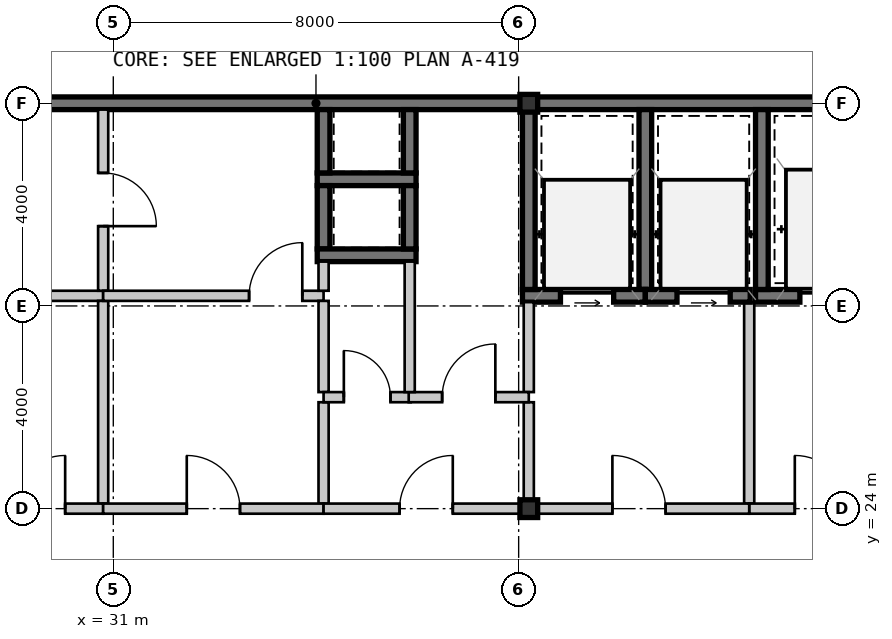
"""IFC4 building model, lengths in metres.
Left out: names, types, materials, properties, quantities, classifications, styles, units other than length and angle.
Written with IfcOpenShell. Run it as: python <this file> out.ifc"""

import sys

from ifc_helpers import new_model, si_unit, direction, frame, frame_2d, origin, origin_2d, place, context, subcontext, project, spatial, rectangle, hollow_rectangle, extrude, source, transform, mapped, element, fill, save


model = new_model("IFC4")
c1 = context("Model", 3, precision=1e-05, world=origin(), true_north=direction((0.0, 1.0)))
c2 = subcontext(c1, "Body", "Model", "MODEL_VIEW")
j1 = project(units=[si_unit("LENGTHUNIT", "METRE"), si_unit("PLANEANGLEUNIT", "RADIAN")], contexts=[c1])
p1 = place(None, origin())
s1 = spatial("IfcSite", under=j1, at=p1, CompositionType="ELEMENT")
p2 = place(p1, origin())
s2 = spatial("IfcBuilding", under=s1, at=p2, CompositionType="ELEMENT")
p3 = place(p2, frame((0.0, 0.0, 178.85)))
s3 = spatial("IfcBuildingStorey", under=s2, at=p3, CompositionType="ELEMENT", Elevation=178.85)
m1 = source(origin(), c2, "Body", "SweptSolid", [
    extrude(hollow_rectangle(XDim=0.35, YDim=0.35, WallThickness=0.016, at=origin_2d()), origin(), (0.0, 0.0, 1.0), 3.15),
])
for number, where, z_axis, x_axis in (
    (1, (39.2, 24.0, 0.0), (0.0, 0.0, 1.0), (1.0, 0.0, 0.0)),
    (2, (39.2, 32.0, 0.0), (0.0, 0.0, 1.0), (1.0, 0.0, 0.0)),
):
    element("IfcColumn", number, at=place(p3, frame(where, z_axis=z_axis, x_axis=x_axis)), inside=s3, PredefinedType="COLUMN", context=c2, shape_type="MappedRepresentation", body=[
        mapped(m1, transform((0.0, 0.0, 0.0), scale=1.0)),
    ])
m2 = source(origin(), c2, "Body", "SweptSolid", [
    extrude(rectangle(XDim=11.2, YDim=0.25, at=frame_2d((5.6, 0.0))), origin(), (0.0, 0.0, 1.0), 2.93),
])
p4 = place(p3, frame((28.0, 32.0, 0.0), z_axis=(0.0, 0.0, 1.0), x_axis=(1.0, 0.0, 0.0)))
e3 = element("IfcWall", 3, at=p4, inside=s3, PredefinedType="SHEAR", context=c2, shape_type="MappedRepresentation", body=[
    mapped(m2, transform((0.0, 0.0, 0.0), scale=1.0)),
])
m3 = source(origin(), c2, "Body", "SweptSolid", [
    extrude(rectangle(XDim=11.925, YDim=0.25, at=frame_2d((5.962, 0.0))), origin(), (0.0, 0.0, 1.0), 2.93),
])
p5 = place(p3, frame((39.2, 32.0, 0.0), z_axis=(0.0, 0.0, 1.0), x_axis=(1.0, 0.0, 0.0)))
e4 = element("IfcWall", 4, at=p5, inside=s3, PredefinedType="SHEAR", context=c2, shape_type="MappedRepresentation", body=[
    mapped(m3, transform((0.0, 0.0, 0.0), scale=1.0)),
])
m4 = source(origin(), c2, "Body", "SweptSolid", [
    extrude(rectangle(XDim=2.85, YDim=0.25, at=frame_2d((1.425, 0.0))), origin(), (0.0, 0.0, 1.0), 2.93),
])
p6 = place(p3, frame((43.675, 28.2, 0.0), z_axis=(0.0, 0.0, 1.0), x_axis=(1.0, 0.0, 0.0)))
e5 = element("IfcWall", 5, at=p6, inside=s3, PredefinedType="SHEAR", context=c2, shape_type="MappedRepresentation", body=[
    mapped(m4, transform((0.0, 0.0, 0.0), scale=1.0)),
])
m5 = source(origin(), c2, "Body", "SweptSolid", [
    extrude(rectangle(XDim=1.1, YDim=2.15, at=frame_2d((0.55, 1.075))), frame((0.0, 0.135, 0.0), z_axis=(0.0, -1.0, 0.0), x_axis=(1.0, 0.0, 0.0)), (0.0, 0.0, 1.0), 0.27),
])
p7 = place(p6, frame((0.875, 0.0, 0.0)))
e6 = element("IfcOpeningElement", 6, at=p7, cuts=e5, PredefinedType="OPENING", context=c2, shape_type="MappedRepresentation", body=[
    mapped(m5, transform((0.0, 0.0, 0.0), scale=1.0)),
])
m6 = source(origin(), c2, "Body", "SweptSolid", [
    extrude(rectangle(XDim=3.55, YDim=0.25, at=frame_2d((1.775, 0.0))), origin(), (0.0, 0.0, 1.0), 2.93),
])
p8 = place(p3, frame((43.8, 31.875, 0.0), z_axis=(0.0, 0.0, 1.0), x_axis=(0.0, -1.0, 0.0)))
e7 = element("IfcWall", 7, at=p8, inside=s3, PredefinedType="SHEAR", context=c2, shape_type="MappedRepresentation", body=[
    mapped(m6, transform((0.0, 0.0, 0.0), scale=1.0)),
])
m7 = source(origin(), c2, "Body", "SweptSolid", [
    extrude(rectangle(XDim=3.975, YDim=0.2, at=frame_2d((1.987, 0.0))), origin(), (0.0, 0.0, 1.0), 2.93),
])
p9 = place(p3, frame((43.55, 28.075, 0.0), z_axis=(0.0, 0.0, 1.0), x_axis=(0.0, -1.0, 0.0)))
e8 = element("IfcWall", 8, at=p9, inside=s3, PredefinedType="SOLIDWALL", context=c2, shape_type="MappedRepresentation", body=[
    mapped(m7, transform((0.0, 0.0, 0.0), scale=1.0)),
])
m8 = source(origin(), c2, "Body", "SweptSolid", [
    extrude(rectangle(XDim=2.725, YDim=0.2, at=frame_2d((1.362, 0.0))), origin(), (0.0, 0.0, 1.0), 2.397),
])
p10 = place(p3, frame((43.55, 24.0, 0.0), z_axis=(0.0, 0.0, 1.0), x_axis=(1.0, 0.0, 0.0)))
e9 = element("IfcWall", 9, at=p10, inside=s3, PredefinedType="SOLIDWALL", context=c2, shape_type="MappedRepresentation", body=[
    mapped(m8, transform((0.0, 0.0, 0.0), scale=1.0)),
])
m9 = source(origin(), c2, "Body", "SweptSolid", [
    extrude(rectangle(XDim=1.05, YDim=2.1, at=frame_2d((0.525, 1.05))), frame((0.0, 0.11, 0.0), z_axis=(0.0, -1.0, 0.0), x_axis=(1.0, 0.0, 0.0)), (0.0, 0.0, 1.0), 0.22),
])
p11 = place(p10, frame((0.9, 0.0, 0.0)))
e10 = element("IfcOpeningElement", 10, at=p11, cuts=e9, PredefinedType="OPENING", context=c2, shape_type="MappedRepresentation", body=[
    mapped(m9, transform((0.0, 0.0, 0.0), scale=1.0)),
])
m10 = source(origin(), c2, "Body", "SweptSolid", [
    extrude(rectangle(XDim=1.95, YDim=0.25, at=frame_2d((0.975, 0.0))), origin(), (0.0, 0.0, 1.0), 2.93),
])
p12 = place(p3, frame((35.025, 30.5, 0.0), z_axis=(0.0, 0.0, 1.0), x_axis=(1.0, 0.0, 0.0)))
e11 = element("IfcWall", 11, at=p12, inside=s3, PredefinedType="SHEAR", context=c2, shape_type="MappedRepresentation", body=[
    mapped(m10, transform((0.0, 0.0, 0.0), scale=1.0)),
])
m11 = source(origin(), c2, "Body", "SweptSolid", [
    extrude(rectangle(XDim=1.25, YDim=0.25, at=frame_2d((0.625, 0.0))), origin(), (0.0, 0.0, 1.0), 2.93),
])
for number, where, z_axis, x_axis in (
    (12, (35.15, 31.875, 0.0), (0.0, 0.0, 1.0), (0.0, -1.0, 0.0)),
    (13, (36.85, 30.625, 0.0), (0.0, 0.0, 1.0), (0.0, 1.0, 0.0)),
    (14, (35.15, 30.375, 0.0), (0.0, 0.0, 1.0), (0.0, -1.0, 0.0)),
):
    element("IfcWall", number, at=place(p3, frame(where, z_axis=z_axis, x_axis=x_axis)), inside=s3, PredefinedType="SHEAR", context=c2, shape_type="MappedRepresentation", body=[
        mapped(m11, transform((0.0, 0.0, 0.0), scale=1.0)),
    ])
p13 = place(p3, frame((35.025, 29.0, 0.0), z_axis=(0.0, 0.0, 1.0), x_axis=(1.0, 0.0, 0.0)))
e15 = element("IfcWall", 15, at=p13, inside=s3, PredefinedType="SHEAR", context=c2, shape_type="MappedRepresentation", body=[
    mapped(m10, transform((0.0, 0.0, 0.0), scale=1.0)),
])
p14 = place(p3, frame((36.85, 29.125, 0.0), z_axis=(0.0, 0.0, 1.0), x_axis=(0.0, 1.0, 0.0)))
e16 = element("IfcWall", 16, at=p14, inside=s3, PredefinedType="SHEAR", context=c2, shape_type="MappedRepresentation", body=[
    mapped(m11, transform((0.0, 0.0, 0.0), scale=1.0)),
])
p15 = place(p3, frame((41.5, 28.325, 0.0), z_axis=(0.0, 0.0, 1.0), x_axis=(0.0, 1.0, 0.0)))
e17 = element("IfcWall", 17, at=p15, inside=s3, PredefinedType="SHEAR", context=c2, shape_type="MappedRepresentation", body=[
    mapped(m6, transform((0.0, 0.0, 0.0), scale=1.0)),
])
m12 = source(origin(), c2, "Body", "SweptSolid", [
    extrude(rectangle(XDim=2.425, YDim=0.25, at=frame_2d((1.212, 0.0))), origin(), (0.0, 0.0, 1.0), 2.93),
])
p16 = place(p3, frame((39.075, 28.2, 0.0), z_axis=(0.0, 0.0, 1.0), x_axis=(1.0, 0.0, 0.0)))
e18 = element("IfcWall", 18, at=p16, inside=s3, PredefinedType="SHEAR", context=c2, shape_type="MappedRepresentation", body=[
    mapped(m12, transform((0.0, 0.0, 0.0), scale=1.0)),
])
m13 = source(origin(), c2, "Body", "SweptSolid", [
    extrude(rectangle(XDim=1.05, YDim=2.15, at=frame_2d((0.525, 1.075))), frame((0.0, 0.135, 0.0), z_axis=(0.0, -1.0, 0.0), x_axis=(1.0, 0.0, 0.0)), (0.0, 0.0, 1.0), 0.27),
])
p17 = place(p16, frame((0.75, 0.0, 0.0)))
e19 = element("IfcOpeningElement", 19, at=p17, cuts=e18, PredefinedType="OPENING", context=c2, shape_type="MappedRepresentation", body=[
    mapped(m13, transform((0.0, 0.0, 0.0), scale=1.0)),
])
p18 = place(p3, frame((39.2, 31.875, 0.0), z_axis=(0.0, 0.0, 1.0), x_axis=(0.0, -1.0, 0.0)))
e20 = element("IfcWall", 20, at=p18, inside=s3, PredefinedType="SHEAR", context=c2, shape_type="MappedRepresentation", body=[
    mapped(m6, transform((0.0, 0.0, 0.0), scale=1.0)),
])
m14 = source(origin(), c2, "Body", "SweptSolid", [
    extrude(rectangle(XDim=2.07, YDim=0.25, at=frame_2d((1.035, 0.0))), origin(), (0.0, 0.0, 1.0), 2.93),
])
p19 = place(p3, frame((41.5, 28.2, 0.0), z_axis=(0.0, 0.0, 1.0), x_axis=(1.0, 0.0, 0.0)))
e21 = element("IfcWall", 21, at=p19, inside=s3, PredefinedType="SHEAR", context=c2, shape_type="MappedRepresentation", body=[
    mapped(m14, transform((0.0, 0.0, 0.0), scale=1.0)),
])
p20 = place(p19, frame((0.625, 0.0, 0.0)))
e22 = element("IfcOpeningElement", 22, at=p20, cuts=e21, PredefinedType="OPENING", context=c2, shape_type="MappedRepresentation", body=[
    mapped(m13, transform((0.0, 0.0, 0.0), scale=1.0)),
])
m15 = source(origin(), c2, "Body", "SweptSolid", [
    extrude(rectangle(XDim=2.0, YDim=0.2, at=frame_2d((1.0, 0.0))), origin(), (0.0, 0.0, 1.0), 2.47),
])
p21 = place(p3, frame((39.2, 24.1, 0.0), z_axis=(0.0, 0.0, 1.0), x_axis=(0.0, 1.0, 0.0)))
e23 = element("IfcWall", 23, at=p21, inside=s3, PredefinedType="SOLIDWALL", context=c2, shape_type="MappedRepresentation", body=[
    mapped(m15, transform((0.0, 0.0, 0.0), scale=1.0)),
])
m16 = source(origin(), c2, "Body", "SweptSolid", [
    extrude(rectangle(XDim=1.775, YDim=0.2, at=frame_2d((0.887, 0.0))), origin(), (0.0, 0.0, 1.0), 2.47),
])
p22 = place(p3, frame((39.2, 26.3, 0.0), z_axis=(0.0, 0.0, 1.0), x_axis=(0.0, 1.0, 0.0)))
e24 = element("IfcWall", 24, at=p22, inside=s3, PredefinedType="SOLIDWALL", context=c2, shape_type="MappedRepresentation", body=[
    mapped(m16, transform((0.0, 0.0, 0.0), scale=1.0)),
])
m17 = source(origin(), c2, "Body", "SweptSolid", [
    extrude(rectangle(XDim=4.35, YDim=0.2, at=frame_2d((2.175, 0.0))), origin(), (0.0, 0.0, 1.0), 2.397),
])
p23 = place(p3, frame((43.55, 24.0, 0.0), z_axis=(0.0, 0.0, 1.0), x_axis=(-1.0, 0.0, 0.0)))
e25 = element("IfcWall", 25, at=p23, inside=s3, PredefinedType="SOLIDWALL", context=c2, shape_type="MappedRepresentation", body=[
    mapped(m17, transform((0.0, 0.0, 0.0), scale=1.0)),
])
p24 = place(p23, frame((1.65, 0.0, 0.0)))
e26 = element("IfcOpeningElement", 26, at=p24, cuts=e25, PredefinedType="OPENING", context=c2, shape_type="MappedRepresentation", body=[
    mapped(m9, transform((0.0, 0.0, 0.0), scale=1.0)),
])
m18 = source(origin(), c2, "Body", "SweptSolid", [
    extrude(rectangle(XDim=4.35, YDim=0.2, at=frame_2d((2.175, 0.0))), origin(), (0.0, 0.0, 1.0), 2.93),
])
p25 = place(p3, frame((26.45, 28.2, 0.0), z_axis=(0.0, 0.0, 1.0), x_axis=(1.0, 0.0, 0.0)))
e27 = element("IfcWall", 27, at=p25, inside=s3, PredefinedType="SOLIDWALL", context=c2, shape_type="MappedRepresentation", body=[
    mapped(m18, transform((0.0, 0.0, 0.0), scale=1.0)),
])
m19 = source(origin(), c2, "Body", "SweptSolid", [
    extrude(rectangle(XDim=4.0, YDim=0.2, at=frame_2d((2.0, 0.0))), origin(), (0.0, 0.0, 1.0), 2.93),
])
p26 = place(p3, frame((30.8, 28.1, 0.0), z_axis=(0.0, 0.0, 1.0), x_axis=(0.0, -1.0, 0.0)))
e28 = element("IfcWall", 28, at=p26, inside=s3, PredefinedType="SOLIDWALL", context=c2, shape_type="MappedRepresentation", body=[
    mapped(m19, transform((0.0, 0.0, 0.0), scale=1.0)),
])
m20 = source(origin(), c2, "Body", "SweptSolid", [
    extrude(rectangle(XDim=4.35, YDim=0.2, at=frame_2d((2.175, 0.0))), origin(), (0.0, 0.0, 1.0), 2.47),
])
p27 = place(p3, frame((30.8, 24.0, 0.0), z_axis=(0.0, 0.0, 1.0), x_axis=(-1.0, 0.0, 0.0)))
e29 = element("IfcWall", 29, at=p27, inside=s3, PredefinedType="SOLIDWALL", context=c2, shape_type="MappedRepresentation", body=[
    mapped(m20, transform((0.0, 0.0, 0.0), scale=1.0)),
])
p28 = place(p27, frame((0.75, 0.0, 0.0)))
e30 = element("IfcOpeningElement", 30, at=p28, cuts=e29, PredefinedType="OPENING", context=c2, shape_type="MappedRepresentation", body=[
    mapped(m9, transform((0.0, 0.0, 0.0), scale=1.0)),
])
m21 = source(origin(), c2, "Body", "SweptSolid", [
    extrude(rectangle(XDim=3.575, YDim=0.2, at=frame_2d((1.788, 0.0))), origin(), (0.0, 0.0, 1.0), 2.93),
])
p29 = place(p3, frame((30.8, 31.875, 0.0), z_axis=(0.0, 0.0, 1.0), x_axis=(0.0, -1.0, 0.0)))
e31 = element("IfcWall", 31, at=p29, inside=s3, PredefinedType="SOLIDWALL", context=c2, shape_type="MappedRepresentation", body=[
    mapped(m21, transform((0.0, 0.0, 0.0), scale=1.0)),
])
p30 = place(p29, frame((1.25, 0.0, 0.0)))
e32 = element("IfcOpeningElement", 32, at=p30, cuts=e31, PredefinedType="OPENING", context=c2, shape_type="MappedRepresentation", body=[
    mapped(m9, transform((0.0, 0.0, 0.0), scale=1.0)),
])
m22 = source(origin(), c2, "Body", "SweptSolid", [
    extrude(rectangle(XDim=4.35, YDim=0.2, at=frame_2d((2.175, 0.0))), origin(), (0.0, 0.0, 1.0), 2.93),
])
p31 = place(p3, frame((30.8, 28.2, 0.0), z_axis=(0.0, 0.0, 1.0), x_axis=(1.0, 0.0, 0.0)))
e33 = element("IfcWall", 33, at=p31, inside=s3, PredefinedType="SOLIDWALL", context=c2, shape_type="MappedRepresentation", body=[
    mapped(m22, transform((0.0, 0.0, 0.0), scale=1.0)),
])
p32 = place(p31, frame((2.88, 0.0, 0.0)))
e34 = element("IfcOpeningElement", 34, at=p32, cuts=e33, PredefinedType="OPENING", context=c2, shape_type="MappedRepresentation", body=[
    mapped(m9, transform((0.0, 0.0, 0.0), scale=1.0)),
])
m23 = source(origin(), c2, "Body", "SweptSolid", [
    extrude(rectangle(XDim=2.0, YDim=0.2, at=frame_2d((1.0, 0.0))), origin(), (0.0, 0.0, 1.0), 2.93),
])
p33 = place(p3, frame((35.15, 26.1, 0.0), z_axis=(0.0, 0.0, 1.0), x_axis=(0.0, -1.0, 0.0)))
e35 = element("IfcWall", 35, at=p33, inside=s3, PredefinedType="SOLIDWALL", context=c2, shape_type="MappedRepresentation", body=[
    mapped(m23, transform((0.0, 0.0, 0.0), scale=1.0)),
])
m24 = source(origin(), c2, "Body", "SweptSolid", [
    extrude(rectangle(XDim=1.8, YDim=0.2, at=frame_2d((0.9, 0.0))), origin(), (0.0, 0.0, 1.0), 2.93),
])
p34 = place(p3, frame((35.15, 28.1, 0.0), z_axis=(0.0, 0.0, 1.0), x_axis=(0.0, -1.0, 0.0)))
e36 = element("IfcWall", 36, at=p34, inside=s3, PredefinedType="SOLIDWALL", context=c2, shape_type="MappedRepresentation", body=[
    mapped(m24, transform((0.0, 0.0, 0.0), scale=1.0)),
])
m25 = source(origin(), c2, "Body", "SweptSolid", [
    extrude(rectangle(XDim=4.35, YDim=0.2, at=frame_2d((2.175, 0.0))), origin(), (0.0, 0.0, 1.0), 2.47),
])
p35 = place(p3, frame((35.15, 24.0, 0.0), z_axis=(0.0, 0.0, 1.0), x_axis=(-1.0, 0.0, 0.0)))
e37 = element("IfcWall", 37, at=p35, inside=s3, PredefinedType="SOLIDWALL", context=c2, shape_type="MappedRepresentation", body=[
    mapped(m25, transform((0.0, 0.0, 0.0), scale=1.0)),
])
p36 = place(p35, frame((1.65, 0.0, 0.0)))
e38 = element("IfcOpeningElement", 38, at=p36, cuts=e37, PredefinedType="OPENING", context=c2, shape_type="MappedRepresentation", body=[
    mapped(m9, transform((0.0, 0.0, 0.0), scale=1.0)),
])
m26 = source(origin(), c2, "Body", "SweptSolid", [
    extrude(rectangle(XDim=0.575, YDim=0.2, at=frame_2d((0.288, 0.0))), origin(), (0.0, 0.0, 1.0), 2.93),
])
p37 = place(p3, frame((35.15, 28.875, 0.0), z_axis=(0.0, 0.0, 1.0), x_axis=(0.0, -1.0, 0.0)))
e39 = element("IfcWall", 39, at=p37, inside=s3, PredefinedType="SOLIDWALL", context=c2, shape_type="MappedRepresentation", body=[
    mapped(m26, transform((0.0, 0.0, 0.0), scale=1.0)),
])
m27 = source(origin(), c2, "Body", "SweptSolid", [
    extrude(rectangle(XDim=1.72, YDim=0.2, at=frame_2d((0.86, 0.0))), origin(), (0.0, 0.0, 1.0), 2.93),
])
p38 = place(p3, frame((35.15, 26.2, 0.0), z_axis=(0.0, 0.0, 1.0), x_axis=(1.0, 0.0, 0.0)))
e40 = element("IfcWall", 40, at=p38, inside=s3, PredefinedType="SOLIDWALL", context=c2, shape_type="MappedRepresentation", body=[
    mapped(m27, transform((0.0, 0.0, 0.0), scale=1.0)),
])
m28 = source(origin(), c2, "Body", "SweptSolid", [
    extrude(rectangle(XDim=0.92, YDim=2.1, at=frame_2d((0.46, 1.05))), frame((0.0, 0.11, 0.0), z_axis=(0.0, -1.0, 0.0), x_axis=(1.0, 0.0, 0.0)), (0.0, 0.0, 1.0), 0.22),
])
p39 = place(p38, frame((0.4, 0.0, 0.0)))
e41 = element("IfcOpeningElement", 41, at=p39, cuts=e40, PredefinedType="OPENING", context=c2, shape_type="MappedRepresentation", body=[
    mapped(m28, transform((0.0, 0.0, 0.0), scale=1.0)),
])
m29 = source(origin(), c2, "Body", "SweptSolid", [
    extrude(rectangle(XDim=2.37, YDim=0.2, at=frame_2d((1.185, 0.0))), origin(), (0.0, 0.0, 1.0), 2.93),
])
p40 = place(p3, frame((36.83, 26.2, 0.0), z_axis=(0.0, 0.0, 1.0), x_axis=(1.0, 0.0, 0.0)))
e42 = element("IfcWall", 42, at=p40, inside=s3, PredefinedType="SOLIDWALL", context=c2, shape_type="MappedRepresentation", body=[
    mapped(m29, transform((0.0, 0.0, 0.0), scale=1.0)),
])
p41 = place(p40, frame((0.66, 0.0, 0.0)))
e43 = element("IfcOpeningElement", 43, at=p41, cuts=e42, PredefinedType="OPENING", context=c2, shape_type="MappedRepresentation", body=[
    mapped(m9, transform((0.0, 0.0, 0.0), scale=1.0)),
])
m30 = source(origin(), c2, "Body", "SweptSolid", [
    extrude(rectangle(XDim=4.05, YDim=0.2, at=frame_2d((2.025, 0.0))), origin(), (0.0, 0.0, 1.0), 2.47),
])
p42 = place(p3, frame((39.2, 24.0, 0.0), z_axis=(0.0, 0.0, 1.0), x_axis=(-1.0, 0.0, 0.0)))
e44 = element("IfcWall", 44, at=p42, inside=s3, PredefinedType="SOLIDWALL", context=c2, shape_type="MappedRepresentation", body=[
    mapped(m30, transform((0.0, 0.0, 0.0), scale=1.0)),
])
p43 = place(p42, frame((1.5, 0.0, 0.0)))
e45 = element("IfcOpeningElement", 45, at=p43, cuts=e44, PredefinedType="OPENING", context=c2, shape_type="MappedRepresentation", body=[
    mapped(m9, transform((0.0, 0.0, 0.0), scale=1.0)),
])
m31 = source(origin(), c2, "Body", "SweptSolid", [
    extrude(rectangle(XDim=2.575, YDim=0.2, at=frame_2d((1.288, 0.0))), origin(), (0.0, 0.0, 1.0), 2.93),
])
p44 = place(p3, frame((36.85, 28.875, 0.0), z_axis=(0.0, 0.0, 1.0), x_axis=(0.0, -1.0, 0.0)))
e46 = element("IfcWall", 46, at=p44, inside=s3, PredefinedType="SOLIDWALL", context=c2, shape_type="MappedRepresentation", body=[
    mapped(m31, transform((0.0, 0.0, 0.0), scale=1.0)),
])
m32 = source(origin(), c2, "Body", "SweptSolid", [
    extrude(rectangle(XDim=1.1, YDim=2.15, at=frame_2d((0.55, 1.075))), frame((0.0, 0.025, 0.0), z_axis=(0.0, -1.0, 0.0), x_axis=(1.0, 0.0, 0.0)), (0.0, 0.0, 1.0), 0.05),
])
p45 = place(p7, origin())
e47 = element("IfcDoor", 47, at=p45, inside=s3, OperationType="SLIDING_TO_LEFT", PredefinedType="DOOR", context=c2, shape_type="MappedRepresentation", body=[
    mapped(m32, transform((0.0, 0.0, 0.0), scale=1.0)),
])
fill(e6, e47)
m33 = source(origin(), c2, "Body", "SweptSolid", [
    extrude(rectangle(XDim=1.05, YDim=2.1, at=frame_2d((0.525, 1.05))), frame((0.0, 0.025, 0.0), z_axis=(0.0, -1.0, 0.0), x_axis=(1.0, 0.0, 0.0)), (0.0, 0.0, 1.0), 0.05),
])
p46 = place(p11, origin())
e48 = element("IfcDoor", 48, at=p46, inside=s3, OperationType="SINGLE_SWING_LEFT", PredefinedType="DOOR", context=c2, shape_type="MappedRepresentation", body=[
    mapped(m33, transform((0.0, 0.0, 0.0), scale=1.0)),
])
fill(e10, e48)
m34 = source(origin(), c2, "Body", "SweptSolid", [
    extrude(rectangle(XDim=1.05, YDim=2.15, at=frame_2d((0.525, 1.075))), frame((0.0, 0.025, 0.0), z_axis=(0.0, -1.0, 0.0), x_axis=(1.0, 0.0, 0.0)), (0.0, 0.0, 1.0), 0.05),
])
p47 = place(p17, origin())
e49 = element("IfcDoor", 49, at=p47, inside=s3, OperationType="SLIDING_TO_LEFT", PredefinedType="DOOR", context=c2, shape_type="MappedRepresentation", body=[
    mapped(m34, transform((0.0, 0.0, 0.0), scale=1.0)),
])
fill(e19, e49)
p48 = place(p20, origin())
e50 = element("IfcDoor", 50, at=p48, inside=s3, OperationType="SLIDING_TO_LEFT", PredefinedType="DOOR", context=c2, shape_type="MappedRepresentation", body=[
    mapped(m34, transform((0.0, 0.0, 0.0), scale=1.0)),
])
fill(e22, e50)
p49 = place(p24, frame((1.05, 0.0, 0.0), z_axis=(0.0, 0.0, 1.0), x_axis=(-1.0, 0.0, 0.0)))
e51 = element("IfcDoor", 51, at=p49, inside=s3, OperationType="SINGLE_SWING_LEFT", PredefinedType="DOOR", context=c2, shape_type="MappedRepresentation", body=[
    mapped(m33, transform((0.0, 0.0, 0.0), scale=1.0)),
])
fill(e26, e51)
p50 = place(p28, frame((1.05, 0.0, 0.0), z_axis=(0.0, 0.0, 1.0), x_axis=(-1.0, 0.0, 0.0)))
e52 = element("IfcDoor", 52, at=p50, inside=s3, OperationType="SINGLE_SWING_RIGHT", PredefinedType="DOOR", context=c2, shape_type="MappedRepresentation", body=[
    mapped(m33, transform((0.0, 0.0, 0.0), scale=1.0)),
])
fill(e30, e52)
p51 = place(p30, origin())
e53 = element("IfcDoor", 53, at=p51, inside=s3, OperationType="SINGLE_SWING_RIGHT", PredefinedType="DOOR", context=c2, shape_type="MappedRepresentation", body=[
    mapped(m33, transform((0.0, 0.0, 0.0), scale=1.0)),
])
fill(e32, e53)
p52 = place(p32, origin())
e54 = element("IfcDoor", 54, at=p52, inside=s3, OperationType="SINGLE_SWING_RIGHT", PredefinedType="DOOR", context=c2, shape_type="MappedRepresentation", body=[
    mapped(m33, transform((0.0, 0.0, 0.0), scale=1.0)),
])
fill(e34, e54)
p53 = place(p36, frame((1.05, 0.0, 0.0), z_axis=(0.0, 0.0, 1.0), x_axis=(-1.0, 0.0, 0.0)))
e55 = element("IfcDoor", 55, at=p53, inside=s3, OperationType="SINGLE_SWING_LEFT", PredefinedType="DOOR", context=c2, shape_type="MappedRepresentation", body=[
    mapped(m33, transform((0.0, 0.0, 0.0), scale=1.0)),
])
fill(e38, e55)
m35 = source(origin(), c2, "Body", "SweptSolid", [
    extrude(rectangle(XDim=0.92, YDim=2.1, at=frame_2d((0.46, 1.05))), frame((0.0, 0.025, 0.0), z_axis=(0.0, -1.0, 0.0), x_axis=(1.0, 0.0, 0.0)), (0.0, 0.0, 1.0), 0.05),
])
p54 = place(p39, origin())
e56 = element("IfcDoor", 56, at=p54, inside=s3, OperationType="SINGLE_SWING_LEFT", PredefinedType="DOOR", context=c2, shape_type="MappedRepresentation", body=[
    mapped(m35, transform((0.0, 0.0, 0.0), scale=1.0)),
])
fill(e41, e56)
p55 = place(p41, origin())
e57 = element("IfcDoor", 57, at=p55, inside=s3, OperationType="SINGLE_SWING_RIGHT", PredefinedType="DOOR", context=c2, shape_type="MappedRepresentation", body=[
    mapped(m33, transform((0.0, 0.0, 0.0), scale=1.0)),
])
fill(e43, e57)
p56 = place(p43, frame((1.05, 0.0, 0.0), z_axis=(0.0, 0.0, 1.0), x_axis=(-1.0, 0.0, 0.0)))
e58 = element("IfcDoor", 58, at=p56, inside=s3, OperationType="SINGLE_SWING_RIGHT", PredefinedType="DOOR", context=c2, shape_type="MappedRepresentation", body=[
    mapped(m33, transform((0.0, 0.0, 0.0), scale=1.0)),
])
fill(e45, e58)
save(model, sys.argv[1])
